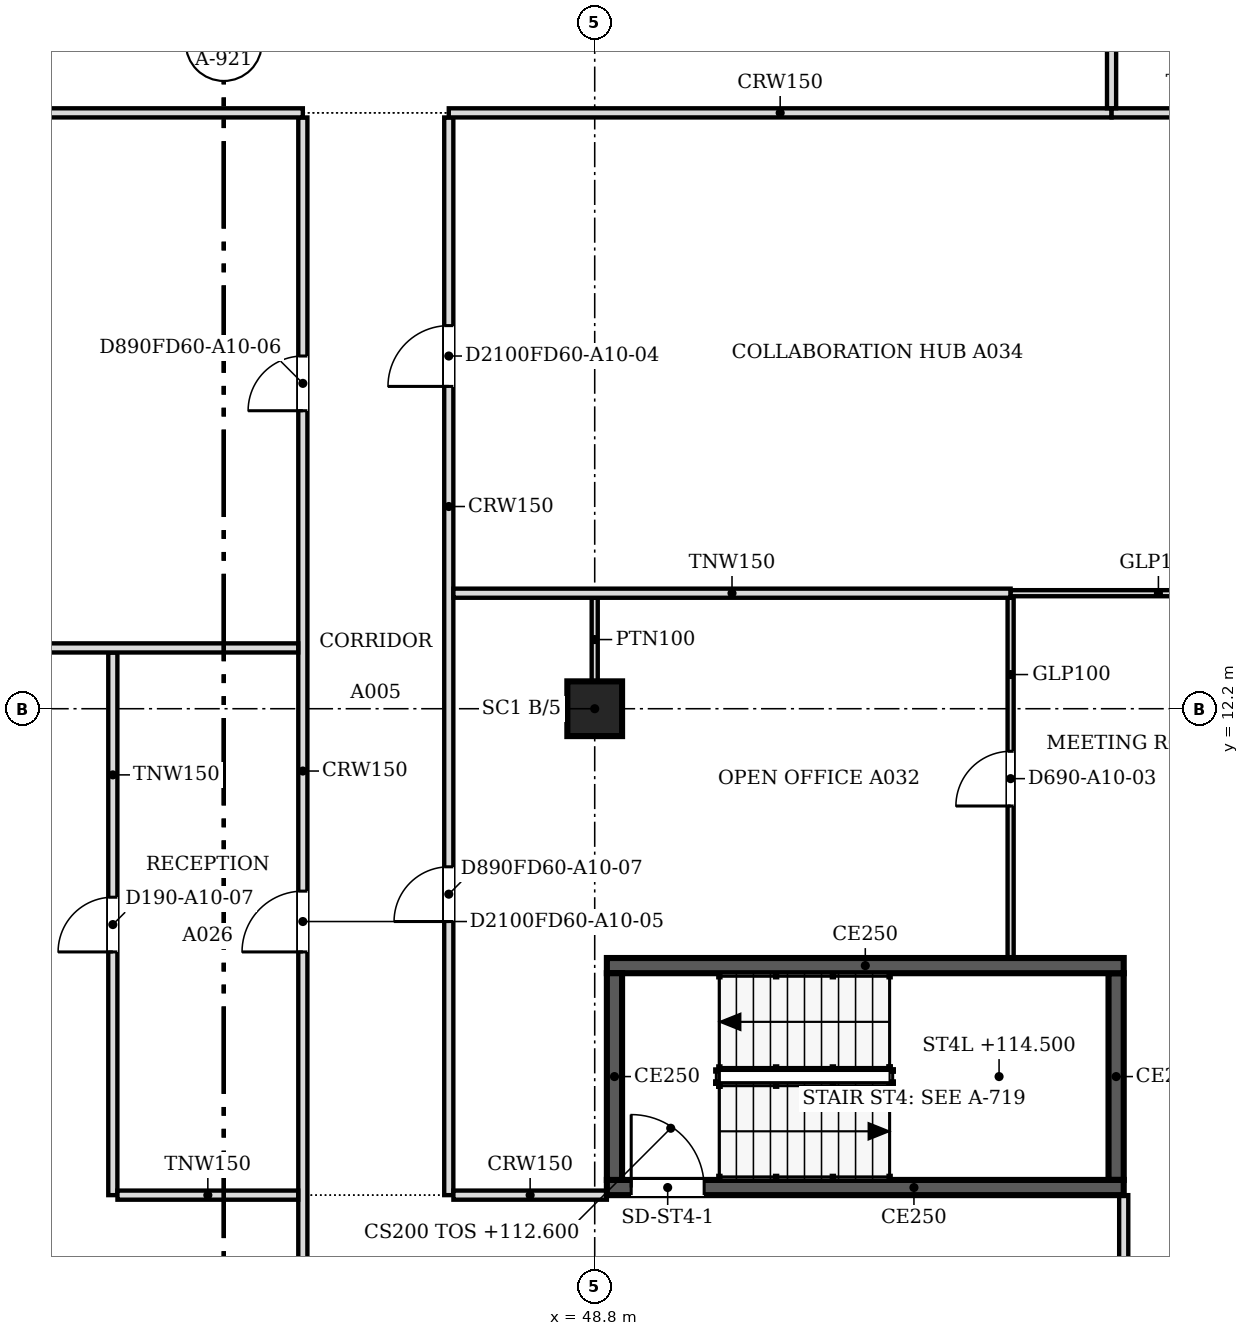
"""IFC4 building model, lengths in metres.
Left out: names, types, materials, properties, quantities, classifications, styles, units other than length and angle.
Written with IfcOpenShell. Run it as: python <this file> out.ifc"""

import sys

from ifc_helpers import new_model, si_unit, direction, frame, frame_2d, origin, origin_2d, place, context, subcontext, project, spatial, polyline, rectangle, outline, extrude, faceted_brep, source, transform, mapped, element, fill, save


model = new_model("IFC4")
c1 = context("Model", 3, precision=1e-05, world=origin(), true_north=direction((0.0, 1.0)))
c2 = subcontext(c1, "Body", "Model", "MODEL_VIEW")
j1 = project(units=[si_unit("LENGTHUNIT", "METRE"), si_unit("PLANEANGLEUNIT", "RADIAN")], contexts=[c1])
p1 = place(None, origin())
s1 = spatial("IfcSite", under=j1, at=p1, CompositionType="ELEMENT")
p2 = place(p1, origin())
s2 = spatial("IfcBuilding", under=s1, at=p2, CompositionType="ELEMENT")
p3 = place(p2, frame((0.0, 0.0, 112.6)))
s3 = spatial("IfcBuildingStorey", under=s2, at=p3, CompositionType="ELEMENT", Elevation=112.6)
p4 = place(p3, frame((48.8, 12.2, 0.0), z_axis=(0.0, 0.0, 1.0), x_axis=(1.0, 0.0, 0.0)))
e1 = element("IfcColumn", 1, at=p4, inside=s3, PredefinedType="COLUMN", context=c2, shape_type="SweptSolid", body=[
    extrude(rectangle(XDim=0.9, YDim=0.9, at=origin_2d()), origin(), (0.0, 0.0, 1.0), 3.6),
])
m1 = source(origin(), c2, "Body", "Brep", [
    faceted_brep([(2.997, -0.25, 3.732), (2.944, -0.25, 3.8), (0.0, -0.25, 0.0), (2.997, -0.25, 0.0), (0.053, 0.25, 0.068), (2.891, 0.25, 3.732), (2.891, 0.25, 0.0), (0.053, 0.25, 0.0), (2.944, 0.0, 3.8), (0.0, 0.0, 0.0)], [[[0, 1, 2, 3]], [[4, 5, 6, 7]], [[8, 1, 0]], [[5, 4, 9, 2, 1, 8]], [[7, 6, 3, 2, 9]], [[7, 9, 4]], [[3, 6, 5, 8, 0]]]),
])
p5 = place(p3, frame((57.606, 1.312, 0.0), z_axis=(0.0, 0.0, 1.0), x_axis=(0.707147509625, 0.707066050402, 0.0)))
e2 = element("IfcWall", 2, at=p5, inside=s3, PredefinedType="SOLIDWALL", context=c2, shape_type="MappedRepresentation", body=[
    mapped(m1, transform((0.0, 0.0, 0.0), scale=1.0)),
])
m2 = source(origin(), c2, "Body", "SweptSolid", [
    extrude(outline(polyline([(2.744, 3.134), (0.51, 0.25), (2.744, 0.25), (2.744, 3.134)])), frame((0.0, 0.26, 0.0), z_axis=(0.0, -1.0, 0.0), x_axis=(1.0, 0.0, 0.0)), (0.0, 0.0, 1.0), 0.52),
])
p6 = place(p5, origin())
e3 = element("IfcOpeningElement", 3, at=p6, cuts=e2, PredefinedType="OPENING", context=c2, shape_type="MappedRepresentation", body=[
    mapped(m2, transform((0.0, 0.0, 0.0), scale=1.0)),
])
p7 = place(p2, frame((0.0, 0.0, 116.4)))
s4 = spatial("IfcBuildingStorey", under=s2, at=p7, CompositionType="ELEMENT", Elevation=116.4)
m3 = source(origin(), c2, "Body", "Brep", [
    faceted_brep([(0.053, -0.25, 0.0), (2.997, -0.25, 3.8), (0.053, -0.25, 7.6), (0.0, -0.25, 7.532), (0.0, -0.25, 0.068), (0.106, 0.25, 7.531), (2.944, 0.25, 3.868), (2.944, 0.25, 3.732), (0.106, 0.25, 0.068), (2.997, 0.0, 3.8), (0.053, 0.0, 0.0), (0.053, 0.0, 7.6)], [[[0, 1, 2, 3, 4]], [[5, 6, 7, 8]], [[8, 7, 9, 1, 0, 10]], [[6, 5, 11, 2, 1, 9]], [[3, 2, 11]], [[10, 0, 4]], [[8, 10, 4, 3, 11, 5]], [[9, 7, 6]]]),
])
p8 = place(p7, frame((57.569, 1.274, -3.8), z_axis=(0.0, 0.0, 1.0), x_axis=(0.707066050402, 0.707147509625, 0.0)))
e4 = element("IfcWall", 4, at=p8, inside=s4, PredefinedType="SOLIDWALL", context=c2, shape_type="MappedRepresentation", body=[
    mapped(m3, transform((0.0, 0.0, 0.0), scale=1.0)),
])
m4 = source(origin(), c2, "Body", "SweptSolid", [
    extrude(outline(polyline([(0.253, 0.666), (2.681, 3.8), (0.253, 6.934), (0.253, 0.666)])), frame((0.0, 0.26, 0.0), z_axis=(0.0, -1.0, 0.0), x_axis=(1.0, 0.0, 0.0)), (0.0, 0.0, 1.0), 0.52),
])
p9 = place(p8, origin())
e5 = element("IfcOpeningElement", 5, at=p9, cuts=e4, PredefinedType="OPENING", context=c2, shape_type="MappedRepresentation", body=[
    mapped(m4, transform((0.0, 0.0, 0.0), scale=1.0)),
])
p10 = place(p3, frame((57.5, 4.325, 0.0), z_axis=(0.0, 0.0, 1.0), x_axis=(-1.0, 0.0, 0.0)))
e6 = element("IfcWall", 6, at=p10, inside=s3, PredefinedType="SOLIDWALL", context=c2, shape_type="SweptSolid", body=[
    extrude(rectangle(XDim=8.5, YDim=0.25, at=frame_2d((4.25, 0.0))), origin(), (0.0, 0.0, 1.0), 3.8),
])
m5 = source(origin(), c2, "Body", "SweptSolid", [
    extrude(rectangle(XDim=1.2, YDim=2.1, at=frame_2d((0.6, 1.05))), frame((0.0, 0.135, 0.0), z_axis=(0.0, -1.0, 0.0), x_axis=(1.0, 0.0, 0.0)), (0.0, 0.0, 1.0), 0.27),
])
p11 = place(p10, frame((6.9, 0.0, 0.0)))
e7 = element("IfcOpeningElement", 7, at=p11, cuts=e6, PredefinedType="OPENING", context=c2, shape_type="MappedRepresentation", body=[
    mapped(m5, transform((0.0, 0.0, 0.0), scale=1.0)),
])
p12 = place(p3, frame((49.125, 4.45, 0.0), z_axis=(0.0, 0.0, 1.0), x_axis=(0.0, 1.0, 0.0)))
e8 = element("IfcWall", 8, at=p12, inside=s3, PredefinedType="SOLIDWALL", context=c2, shape_type="SweptSolid", body=[
    extrude(rectangle(XDim=3.4, YDim=0.25, at=frame_2d((1.7, 0.0))), origin(), (0.0, 0.0, 1.0), 3.8),
])
p13 = place(p3, frame((49.0, 7.975, 0.0), z_axis=(0.0, 0.0, 1.0), x_axis=(1.0, 0.0, 0.0)))
e9 = element("IfcWall", 9, at=p13, inside=s3, PredefinedType="SOLIDWALL", context=c2, shape_type="SweptSolid", body=[
    extrude(rectangle(XDim=8.5, YDim=0.25, at=frame_2d((4.25, 0.0))), origin(), (0.0, 0.0, 1.0), 3.8),
])
p14 = place(p3, frame((57.375, 7.85, 0.0), z_axis=(0.0, 0.0, 1.0), x_axis=(0.0, -1.0, 0.0)))
e10 = element("IfcWall", 10, at=p14, inside=s3, PredefinedType="SOLIDWALL", context=c2, shape_type="SweptSolid", body=[
    extrude(rectangle(XDim=3.4, YDim=0.25, at=frame_2d((1.7, 0.0))), origin(), (0.0, 0.0, 1.0), 3.8),
])
p15 = place(p3, frame((44.0, 0.5, 0.0), z_axis=(0.0, 0.0, 1.0), x_axis=(0.0, 1.0, 0.0)))
e11 = element("IfcWall", 11, at=p15, inside=s3, PredefinedType="PARTITIONING", context=c2, shape_type="SweptSolid", body=[
    extrude(rectangle(XDim=21.424, YDim=0.15, at=frame_2d((10.712, 0.0))), origin(), (0.0, 0.0, 1.0), 3.067),
])
m6 = source(origin(), c2, "Body", "SweptSolid", [
    extrude(rectangle(XDim=0.9, YDim=2.1, at=frame_2d((0.45, 1.05))), frame((0.0, 0.085, 0.0), z_axis=(0.0, -1.0, 0.0), x_axis=(1.0, 0.0, 0.0)), (0.0, 0.0, 1.0), 0.17),
])
p16 = place(p15, frame((16.601, 0.0, 0.0)))
e12 = element("IfcOpeningElement", 12, at=p16, cuts=e11, PredefinedType="OPENING", context=c2, shape_type="MappedRepresentation", body=[
    mapped(m6, transform((0.0, 0.0, 0.0), scale=1.0)),
])
m7 = source(origin(), c2, "Body", "SweptSolid", [
    extrude(rectangle(XDim=1.0, YDim=2.1, at=frame_2d((0.5, 1.05))), frame((0.0, 0.085, 0.0), z_axis=(0.0, -1.0, 0.0), x_axis=(1.0, 0.0, 0.0)), (0.0, 0.0, 1.0), 0.17),
])
p17 = place(p15, frame((7.7, 0.0, 0.0)))
e13 = element("IfcOpeningElement", 13, at=p17, cuts=e11, PredefinedType="OPENING", context=c2, shape_type="MappedRepresentation", body=[
    mapped(m7, transform((0.0, 0.0, 0.0), scale=1.0)),
])
p18 = place(p3, frame((57.5, 1.559, 0.0), z_axis=(0.0, 0.0, 1.0), x_axis=(0.0, 1.0, 0.0)))
e14 = element("IfcWall", 14, at=p18, inside=s3, PredefinedType="PARTITIONING", context=c2, shape_type="SweptSolid", body=[
    extrude(rectangle(XDim=2.641, YDim=0.15, at=frame_2d((1.32, 0.0))), origin(), (0.0, 0.0, 1.0), 3.067),
])
p19 = place(p3, frame((40.875, 4.2, 0.0), z_axis=(0.0, 0.0, 1.0), x_axis=(0.0, 1.0, 0.0)))
e15 = element("IfcWall", 15, at=p19, inside=s3, PredefinedType="PARTITIONING", context=c2, shape_type="SweptSolid", body=[
    extrude(rectangle(XDim=8.924, YDim=0.15, at=frame_2d((4.462, 0.0))), origin(), (0.0, 0.0, 1.0), 3.067),
])
p20 = place(p19, frame((4.0, 0.0, 0.0)))
e16 = element("IfcOpeningElement", 16, at=p20, cuts=e15, PredefinedType="OPENING", context=c2, shape_type="MappedRepresentation", body=[
    mapped(m6, transform((0.0, 0.0, 0.0), scale=1.0)),
])
p21 = place(p3, frame((40.951, 4.2, 0.0), z_axis=(0.0, 0.0, 1.0), x_axis=(1.0, 0.0, 0.0)))
e17 = element("IfcWall", 17, at=p21, inside=s3, PredefinedType="PARTITIONING", context=c2, shape_type="SweptSolid", body=[
    extrude(rectangle(XDim=2.973, YDim=0.15, at=frame_2d((1.487, 0.0))), origin(), (0.0, 0.0, 1.0), 3.067),
])
p22 = place(p3, frame((46.4, 21.924, 0.0), z_axis=(0.0, 0.0, 1.0), x_axis=(0.0, -1.0, 0.0)))
e18 = element("IfcWall", 18, at=p22, inside=s3, PredefinedType="PARTITIONING", context=c2, shape_type="SweptSolid", body=[
    extrude(rectangle(XDim=17.724, YDim=0.15, at=frame_2d((8.862, 0.0))), origin(), (0.0, 0.0, 1.0), 3.067),
])
p23 = place(p22, frame((3.423, 0.0, 0.0)))
e19 = element("IfcOpeningElement", 19, at=p23, cuts=e18, PredefinedType="OPENING", context=c2, shape_type="MappedRepresentation", body=[
    mapped(m7, transform((0.0, 0.0, 0.0), scale=1.0)),
])
p24 = place(p22, frame((12.324, 0.0, 0.0)))
e20 = element("IfcOpeningElement", 20, at=p24, cuts=e18, PredefinedType="OPENING", context=c2, shape_type="MappedRepresentation", body=[
    mapped(m6, transform((0.0, 0.0, 0.0), scale=1.0)),
])
p25 = place(p3, frame((46.476, 4.2, 0.0), z_axis=(0.0, 0.0, 1.0), x_axis=(1.0, 0.0, 0.0)))
e21 = element("IfcWall", 21, at=p25, inside=s3, PredefinedType="PARTITIONING", context=c2, shape_type="SweptSolid", body=[
    extrude(rectangle(XDim=2.524, YDim=0.15, at=frame_2d((1.262, 0.0))), origin(), (0.0, 0.0, 1.0), 3.067),
])
p26 = place(p3, frame((55.64, 14.024, 0.0), z_axis=(0.0, 0.0, 1.0), x_axis=(0.0, -1.0, 0.0)))
e22 = element("IfcWall", 22, at=p26, inside=s3, PredefinedType="PARTITIONING", context=c2, shape_type="SweptSolid", body=[
    extrude(rectangle(XDim=5.924, YDim=0.1, at=frame_2d((2.962, 0.0))), origin(), (0.0, 0.0, 1.0), 3.067),
])
m8 = source(origin(), c2, "Body", "SweptSolid", [
    extrude(rectangle(XDim=0.9, YDim=2.1, at=frame_2d((0.45, 1.05))), frame((0.0, 0.06, 0.0), z_axis=(0.0, -1.0, 0.0), x_axis=(1.0, 0.0, 0.0)), (0.0, 0.0, 1.0), 0.12),
])
p27 = place(p26, frame((2.524, 0.0, 0.0)))
e23 = element("IfcOpeningElement", 23, at=p27, cuts=e22, PredefinedType="OPENING", context=c2, shape_type="MappedRepresentation", body=[
    mapped(m8, transform((0.0, 0.0, 0.0), scale=1.0)),
])
p28 = place(p3, frame((48.8, 12.65, 0.0), z_axis=(0.0, 0.0, 1.0), x_axis=(0.0, 1.0, 0.0)))
e24 = element("IfcWall", 24, at=p28, inside=s3, PredefinedType="PARTITIONING", context=c2, shape_type="SweptSolid", body=[
    extrude(rectangle(XDim=1.375, YDim=0.1, at=frame_2d((0.688, 0.0))), origin(), (0.0, 0.0, 1.0), 3.067),
])
p29 = place(p3, frame((27.275, 13.2, 0.0), z_axis=(0.0, 0.0, 1.0), x_axis=(1.0, 0.0, 0.0)))
e25 = element("IfcWall", 25, at=p29, inside=s3, PredefinedType="PARTITIONING", context=c2, shape_type="SweptSolid", body=[
    extrude(rectangle(XDim=16.649, YDim=0.15, at=frame_2d((8.325, 0.0))), origin(), (0.0, 0.0, 1.0), 3.067),
])
p30 = place(p3, frame((46.476, 14.1, 0.0), z_axis=(0.0, 0.0, 1.0), x_axis=(1.0, 0.0, 0.0)))
e26 = element("IfcWall", 26, at=p30, inside=s3, PredefinedType="PARTITIONING", context=c2, shape_type="SweptSolid", body=[
    extrude(rectangle(XDim=9.164, YDim=0.15, at=frame_2d((4.582, 0.0))), origin(), (0.0, 0.0, 1.0), 3.067),
])
p31 = place(p3, frame((55.641, 14.1, 0.0), z_axis=(0.0, 0.0, 1.0), x_axis=(1.0, 0.0, 0.0)))
e27 = element("IfcWall", 27, at=p31, inside=s3, PredefinedType="PARTITIONING", context=c2, shape_type="SweptSolid", body=[
    extrude(rectangle(XDim=4.859, YDim=0.1, at=frame_2d((2.429, 0.0))), origin(), (0.0, 0.0, 1.0), 3.067),
])
p32 = place(p3, frame((30.5, 22.0, 0.0), z_axis=(0.0, 0.0, 1.0), x_axis=(1.0, 0.0, 0.0)))
e28 = element("IfcWall", 28, at=p32, inside=s3, PredefinedType="PARTITIONING", context=c2, shape_type="SweptSolid", body=[
    extrude(rectangle(XDim=13.5, YDim=0.15, at=frame_2d((6.75, 0.0))), origin(), (0.0, 0.0, 1.0), 3.067),
])
p33 = place(p3, frame((46.4, 22.0, 0.0), z_axis=(0.0, 0.0, 1.0), x_axis=(1.0, 0.0, 0.0)))
e29 = element("IfcWall", 29, at=p33, inside=s3, PredefinedType="PARTITIONING", context=c2, shape_type="SweptSolid", body=[
    extrude(rectangle(XDim=10.9, YDim=0.15, at=frame_2d((5.45, 0.0))), origin(), (0.0, 0.0, 1.0), 3.067),
])
p34 = place(p3, frame((57.301, 22.0, 0.0), z_axis=(0.0, 0.0, 1.0), x_axis=(1.0, 0.0, 0.0)))
e30 = element("IfcWall", 30, at=p34, inside=s3, PredefinedType="PARTITIONING", context=c2, shape_type="SweptSolid", body=[
    extrude(rectangle(XDim=3.199, YDim=0.15, at=frame_2d((1.6, 0.0))), origin(), (0.0, 0.0, 1.0), 3.067),
])
p35 = place(p3, frame((57.3, 30.6, 0.0), z_axis=(0.0, 0.0, 1.0), x_axis=(0.0, -1.0, 0.0)))
e31 = element("IfcWall", 31, at=p35, inside=s3, PredefinedType="PARTITIONING", context=c2, shape_type="SweptSolid", body=[
    extrude(rectangle(XDim=8.524, YDim=0.15, at=frame_2d((4.262, 0.0))), origin(), (0.0, 0.0, 1.0), 3.067),
])
p36 = place(p35, frame((3.824, 0.0, 0.0)))
e32 = element("IfcOpeningElement", 32, at=p36, cuts=e31, PredefinedType="OPENING", context=c2, shape_type="MappedRepresentation", body=[
    mapped(m6, transform((0.0, 0.0, 0.0), scale=1.0)),
])
m9 = source(origin(), c2, "Body", "SweptSolid", [
    extrude(rectangle(XDim=1.2, YDim=2.1, at=frame_2d((0.6, 1.05))), frame((0.0, 0.025, 0.0), z_axis=(0.0, -1.0, 0.0), x_axis=(1.0, 0.0, 0.0)), (0.0, 0.0, 1.0), 0.05),
])
p37 = place(p11, origin())
e33 = element("IfcDoor", 33, at=p37, inside=s3, OperationType="SINGLE_SWING_RIGHT", PredefinedType="DOOR", context=c2, shape_type="MappedRepresentation", body=[
    mapped(m9, transform((0.0, 0.0, 0.0), scale=1.0)),
])
fill(e7, e33)
m10 = source(origin(), c2, "Body", "SweptSolid", [
    extrude(rectangle(XDim=0.9, YDim=2.1, at=frame_2d((0.45, 1.05))), frame((0.0, 0.025, 0.0), z_axis=(0.0, -1.0, 0.0), x_axis=(1.0, 0.0, 0.0)), (0.0, 0.0, 1.0), 0.05),
])
p38 = place(p27, origin())
e34 = element("IfcDoor", 34, at=p38, inside=s3, OperationType="SINGLE_SWING_RIGHT", PredefinedType="DOOR", context=c2, shape_type="MappedRepresentation", body=[
    mapped(m10, transform((0.0, 0.0, 0.0), scale=1.0)),
])
fill(e23, e34)
m11 = source(origin(), c2, "Body", "SweptSolid", [
    extrude(rectangle(XDim=1.0, YDim=2.1, at=frame_2d((0.5, 1.05))), frame((0.0, 0.025, 0.0), z_axis=(0.0, -1.0, 0.0), x_axis=(1.0, 0.0, 0.0)), (0.0, 0.0, 1.0), 0.05),
])
p39 = place(p23, origin())
e35 = element("IfcDoor", 35, at=p39, inside=s3, OperationType="SINGLE_SWING_RIGHT", PredefinedType="DOOR", context=c2, shape_type="MappedRepresentation", body=[
    mapped(m11, transform((0.0, 0.0, 0.0), scale=1.0)),
])
fill(e19, e35)
p40 = place(p16, origin())
e36 = element("IfcDoor", 36, at=p40, inside=s3, OperationType="SINGLE_SWING_LEFT", PredefinedType="DOOR", context=c2, shape_type="MappedRepresentation", body=[
    mapped(m10, transform((0.0, 0.0, 0.0), scale=1.0)),
])
fill(e12, e36)
p41 = place(p17, origin())
e37 = element("IfcDoor", 37, at=p41, inside=s3, OperationType="SINGLE_SWING_LEFT", PredefinedType="DOOR", context=c2, shape_type="MappedRepresentation", body=[
    mapped(m11, transform((0.0, 0.0, 0.0), scale=1.0)),
])
fill(e13, e37)
p42 = place(p24, origin())
e38 = element("IfcDoor", 38, at=p42, inside=s3, OperationType="SINGLE_SWING_RIGHT", PredefinedType="DOOR", context=c2, shape_type="MappedRepresentation", body=[
    mapped(m10, transform((0.0, 0.0, 0.0), scale=1.0)),
])
fill(e20, e38)
p43 = place(p20, origin())
e39 = element("IfcDoor", 39, at=p43, inside=s3, OperationType="SINGLE_SWING_LEFT", PredefinedType="DOOR", context=c2, shape_type="MappedRepresentation", body=[
    mapped(m10, transform((0.0, 0.0, 0.0), scale=1.0)),
])
fill(e16, e39)
save(model, sys.argv[1])
